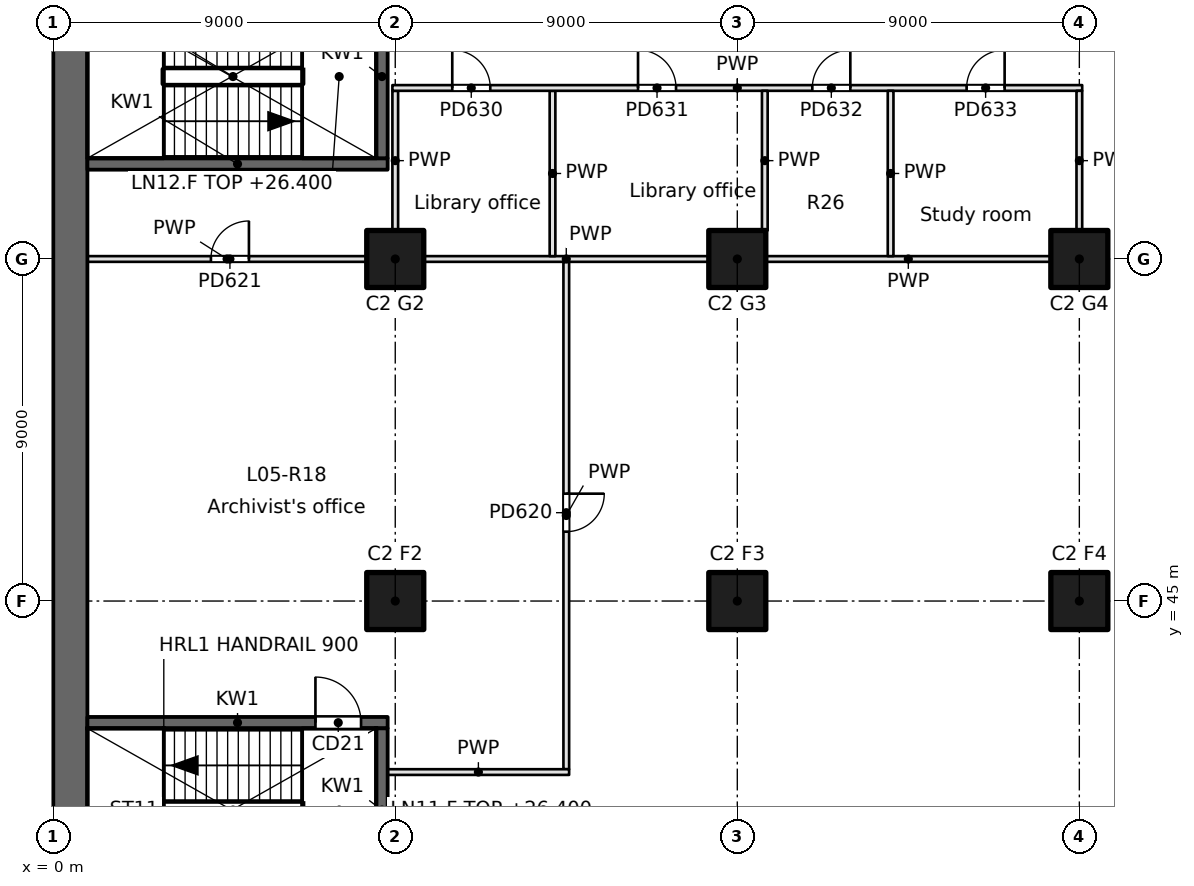
"""IFC4 building model, lengths in metres.
Left out: names, types, materials, properties, quantities, classifications, styles, units other than length and angle.
Written with IfcOpenShell. Run it as: python <this file> out.ifc"""

import sys

from ifc_helpers import new_model, si_unit, direction, frame, frame_2d, origin, origin_2d, place, context, subcontext, project, spatial, rectangle, extrude, element, fill, save


model = new_model("IFC4")
c1 = context("Model", 3, precision=1e-05, world=origin(), true_north=direction((0.0, 1.0)))
c2 = subcontext(c1, "Body", "Model", "MODEL_VIEW")
j1 = project(units=[si_unit("LENGTHUNIT", "METRE"), si_unit("PLANEANGLEUNIT", "RADIAN")], contexts=[c1])
p1 = place(None, origin())
s1 = spatial("IfcSite", under=j1, at=p1, CompositionType="ELEMENT")
p2 = place(p1, origin())
s2 = spatial("IfcBuilding", under=s1, at=p2, CompositionType="ELEMENT")
p3 = place(p2, frame((0.0, 0.0, 26.4)))
s3 = spatial("IfcBuildingStorey", under=s2, at=p3, CompositionType="ELEMENT", Elevation=26.4)
for number, where, z_axis, x_axis in (
    (1, (9.0, 45.0, 0.0), (0.0, 0.0, 1.0), (1.0, 0.0, 0.0)),
    (2, (9.0, 54.0, 0.0), (0.0, 0.0, 1.0), (1.0, 0.0, 0.0)),
    (3, (18.0, 45.0, 0.0), (0.0, 0.0, 1.0), (1.0, 0.0, 0.0)),
    (4, (18.0, 54.0, 0.0), (0.0, 0.0, 1.0), (1.0, 0.0, 0.0)),
    (5, (27.0, 45.0, 0.0), (0.0, 0.0, 1.0), (1.0, 0.0, 0.0)),
    (6, (27.0, 54.0, 0.0), (0.0, 0.0, 1.0), (1.0, 0.0, 0.0)),
):
    element("IfcColumn", number, at=place(p3, frame(where, z_axis=z_axis, x_axis=x_axis)), inside=s3, PredefinedType="COLUMN", context=c2, shape_type="SweptSolid", body=[
        extrude(rectangle(XDim=1.5, YDim=1.5, at=origin_2d()), origin(), (0.0, 0.0, 1.0), 4.8),
    ])
p4 = place(p3, frame((0.45, 94.5, 0.0), z_axis=(0.0, 0.0, 1.0), x_axis=(0.0, -1.0, 0.0)))
e7 = element("IfcWall", 7, at=p4, inside=s3, PredefinedType="SHEAR", context=c2, shape_type="SweptSolid", body=[
    extrude(rectangle(XDim=66.085, YDim=0.9, at=frame_2d((33.042, 0.0))), origin(), (0.0, 0.0, 1.0), 4.8),
])
p5 = place(p3, frame((0.9, 41.8, -0.35), z_axis=(0.0, 0.0, 1.0), x_axis=(1.0, 0.0, 0.0)))
e8 = element("IfcWall", 8, at=p5, inside=s3, PredefinedType="SOLIDWALL", context=c2, shape_type="SweptSolid", body=[
    extrude(rectangle(XDim=7.9, YDim=0.3, at=frame_2d((3.95, 0.0))), origin(), (0.0, 0.0, 1.0), 4.7),
])
p6 = place(p5, frame((6.0, 0.0, 0.35)))
e9 = element("IfcOpeningElement", 9, at=p6, cuts=e8, PredefinedType="OPENING", context=c2, shape_type="SweptSolid", body=[
    extrude(rectangle(XDim=1.2, YDim=2.1, at=frame_2d((0.6, 1.05))), frame((0.0, 0.15, 0.0), z_axis=(0.0, -1.0, 0.0), x_axis=(1.0, 0.0, 0.0)), (0.0, 0.0, 1.0), 0.3),
])
p7 = place(p3, frame((0.9, 56.5, -0.35), z_axis=(0.0, 0.0, 1.0), x_axis=(1.0, 0.0, 0.0)))
e10 = element("IfcWall", 10, at=p7, inside=s3, PredefinedType="SOLIDWALL", context=c2, shape_type="SweptSolid", body=[
    extrude(rectangle(XDim=7.9, YDim=0.3, at=frame_2d((3.95, 0.0))), origin(), (0.0, 0.0, 1.0), 4.7),
])
p8 = place(p3, frame((8.65, 37.35, -0.35), z_axis=(0.0, 0.0, 1.0), x_axis=(0.0, 1.0, 0.0)))
e11 = element("IfcWall", 11, at=p8, inside=s3, PredefinedType="SOLIDWALL", context=c2, shape_type="SweptSolid", body=[
    extrude(rectangle(XDim=4.3, YDim=0.3, at=frame_2d((2.15, 0.0))), origin(), (0.0, 0.0, 1.0), 4.7),
])
p9 = place(p3, frame((8.65, 56.65, -0.35), z_axis=(0.0, 0.0, 1.0), x_axis=(0.0, 1.0, 0.0)))
e12 = element("IfcWall", 12, at=p9, inside=s3, PredefinedType="SOLIDWALL", context=c2, shape_type="SweptSolid", body=[
    extrude(rectangle(XDim=4.3, YDim=0.3, at=frame_2d((2.15, 0.0))), origin(), (0.0, 0.0, 1.0), 4.7),
])
p10 = place(p3, frame((0.9, 54.0, 0.0), z_axis=(0.0, 0.0, 1.0), x_axis=(1.0, 0.0, 0.0)))
e13 = element("IfcWall", 13, at=p10, inside=s3, PredefinedType="PARTITIONING", context=c2, shape_type="SweptSolid", body=[
    extrude(rectangle(XDim=7.35, YDim=0.15, at=frame_2d((3.675, 0.0))), origin(), (0.0, 0.0, 1.0), 4.35),
])
p11 = place(p10, frame((3.25, 0.0, 0.0)))
e14 = element("IfcOpeningElement", 14, at=p11, cuts=e13, PredefinedType="OPENING", context=c2, shape_type="SweptSolid", body=[
    extrude(rectangle(XDim=1.0, YDim=2.1, at=frame_2d((0.5, 1.05))), frame((0.0, 0.075, 0.0), z_axis=(0.0, -1.0, 0.0), x_axis=(1.0, 0.0, 0.0)), (0.0, 0.0, 1.0), 0.15),
])
for number, where, z_axis, x_axis in (
    (15, (9.75, 54.0, 0.0), (0.0, 0.0, 1.0), (1.0, 0.0, 0.0)),
    (16, (26.25, 54.0, 0.0), (0.0, 0.0, 1.0), (-1.0, 0.0, 0.0)),
):
    element("IfcWall", number, at=place(p3, frame(where, z_axis=z_axis, x_axis=x_axis)), inside=s3, PredefinedType="PARTITIONING", context=c2, shape_type="SweptSolid", body=[
        extrude(rectangle(XDim=7.5, YDim=0.15, at=frame_2d((3.75, 0.0))), origin(), (0.0, 0.0, 1.0), 4.35),
    ])
p12 = place(p3, frame((13.5, 53.925, 0.0), z_axis=(0.0, 0.0, 1.0), x_axis=(0.0, -1.0, 0.0)))
e17 = element("IfcWall", 17, at=p12, inside=s3, PredefinedType="PARTITIONING", context=c2, shape_type="SweptSolid", body=[
    extrude(rectangle(XDim=13.35, YDim=0.15, at=frame_2d((6.675, 0.0))), origin(), (0.0, 0.0, 1.0), 4.35),
])
p13 = place(p12, frame((6.1, 0.0, 0.0)))
e18 = element("IfcOpeningElement", 18, at=p13, cuts=e17, PredefinedType="OPENING", context=c2, shape_type="SweptSolid", body=[
    extrude(rectangle(XDim=1.0, YDim=2.1, at=frame_2d((0.5, 1.05))), frame((0.0, 0.075, 0.0), z_axis=(0.0, -1.0, 0.0), x_axis=(1.0, 0.0, 0.0)), (0.0, 0.0, 1.0), 0.15),
])
p14 = place(p3, frame((13.575, 40.5, 0.0), z_axis=(0.0, 0.0, 1.0), x_axis=(-1.0, 0.0, 0.0)))
e19 = element("IfcWall", 19, at=p14, inside=s3, PredefinedType="PARTITIONING", context=c2, shape_type="SweptSolid", body=[
    extrude(rectangle(XDim=4.775, YDim=0.15, at=frame_2d((2.387, 0.0))), origin(), (0.0, 0.0, 1.0), 4.35),
])
p15 = place(p3, frame((13.138, 54.075, 0.0), z_axis=(0.0, 0.0, 1.0), x_axis=(0.0, 1.0, 0.0)))
e20 = element("IfcWall", 20, at=p15, inside=s3, PredefinedType="PARTITIONING", context=c2, shape_type="SweptSolid", body=[
    extrude(rectangle(XDim=4.35, YDim=0.15, at=frame_2d((2.175, 0.0))), origin(), (0.0, 0.0, 1.0), 4.35),
])
p16 = place(p3, frame((9.0, 54.75, 0.0), z_axis=(0.0, 0.0, 1.0), x_axis=(0.0, 1.0, 0.0)))
e21 = element("IfcWall", 21, at=p16, inside=s3, PredefinedType="PARTITIONING", context=c2, shape_type="SweptSolid", body=[
    extrude(rectangle(XDim=3.675, YDim=0.15, at=frame_2d((1.837, 0.0))), origin(), (0.0, 0.0, 1.0), 4.35),
])
p17 = place(p3, frame((8.925, 58.5, 0.0), z_axis=(0.0, 0.0, 1.0), x_axis=(1.0, 0.0, 0.0)))
e22 = element("IfcWall", 22, at=p17, inside=s3, PredefinedType="PARTITIONING", context=c2, shape_type="SweptSolid", body=[
    extrude(rectangle(XDim=18.15, YDim=0.15, at=frame_2d((9.075, 0.0))), origin(), (0.0, 0.0, 1.0), 4.35),
])
p18 = place(p17, frame((1.575, 0.0, 0.0)))
e23 = element("IfcOpeningElement", 23, at=p18, cuts=e22, PredefinedType="OPENING", context=c2, shape_type="SweptSolid", body=[
    extrude(rectangle(XDim=1.0, YDim=2.1, at=frame_2d((0.5, 1.05))), frame((0.0, 0.075, 0.0), z_axis=(0.0, -1.0, 0.0), x_axis=(1.0, 0.0, 0.0)), (0.0, 0.0, 1.0), 0.15),
])
p19 = place(p17, frame((6.463, 0.0, 0.0)))
e24 = element("IfcOpeningElement", 24, at=p19, cuts=e22, PredefinedType="OPENING", context=c2, shape_type="SweptSolid", body=[
    extrude(rectangle(XDim=1.0, YDim=2.1, at=frame_2d((0.5, 1.05))), frame((0.0, 0.075, 0.0), z_axis=(0.0, -1.0, 0.0), x_axis=(1.0, 0.0, 0.0)), (0.0, 0.0, 1.0), 0.15),
])
p20 = place(p17, frame((11.049, 0.0, 0.0)))
e25 = element("IfcOpeningElement", 25, at=p20, cuts=e22, PredefinedType="OPENING", context=c2, shape_type="SweptSolid", body=[
    extrude(rectangle(XDim=1.0, YDim=2.1, at=frame_2d((0.5, 1.05))), frame((0.0, 0.075, 0.0), z_axis=(0.0, -1.0, 0.0), x_axis=(1.0, 0.0, 0.0)), (0.0, 0.0, 1.0), 0.15),
])
p21 = place(p17, frame((15.109, 0.0, 0.0)))
e26 = element("IfcOpeningElement", 26, at=p21, cuts=e22, PredefinedType="OPENING", context=c2, shape_type="SweptSolid", body=[
    extrude(rectangle(XDim=1.0, YDim=2.1, at=frame_2d((0.5, 1.05))), frame((0.0, 0.075, 0.0), z_axis=(0.0, -1.0, 0.0), x_axis=(1.0, 0.0, 0.0)), (0.0, 0.0, 1.0), 0.15),
])
p22 = place(p3, frame((18.724, 54.75, 0.0), z_axis=(0.0, 0.0, 1.0), x_axis=(0.0, 1.0, 0.0)))
e27 = element("IfcWall", 27, at=p22, inside=s3, PredefinedType="PARTITIONING", context=c2, shape_type="SweptSolid", body=[
    extrude(rectangle(XDim=3.675, YDim=0.15, at=frame_2d((1.837, 0.0))), origin(), (0.0, 0.0, 1.0), 4.35),
])
p23 = place(p3, frame((22.034, 54.075, 0.0), z_axis=(0.0, 0.0, 1.0), x_axis=(0.0, 1.0, 0.0)))
e28 = element("IfcWall", 28, at=p23, inside=s3, PredefinedType="PARTITIONING", context=c2, shape_type="SweptSolid", body=[
    extrude(rectangle(XDim=4.35, YDim=0.15, at=frame_2d((2.175, 0.0))), origin(), (0.0, 0.0, 1.0), 4.35),
])
p24 = place(p3, frame((27.0, 58.425, 0.0), z_axis=(0.0, 0.0, 1.0), x_axis=(0.0, -1.0, 0.0)))
e29 = element("IfcWall", 29, at=p24, inside=s3, PredefinedType="PARTITIONING", context=c2, shape_type="SweptSolid", body=[
    extrude(rectangle(XDim=3.675, YDim=0.15, at=frame_2d((1.837, 0.0))), origin(), (0.0, 0.0, 1.0), 4.35),
])
p25 = place(p6, origin())
e30 = element("IfcDoor", 30, at=p25, inside=s3, OperationType="SINGLE_SWING_LEFT", PredefinedType="DOOR", context=c2, shape_type="SweptSolid", body=[
    extrude(rectangle(XDim=1.2, YDim=2.1, at=frame_2d((0.6, 1.05))), frame((0.0, 0.025, 0.0), z_axis=(0.0, -1.0, 0.0), x_axis=(1.0, 0.0, 0.0)), (0.0, 0.0, 1.0), 0.05),
])
fill(e9, e30)
p26 = place(p13, origin())
e31 = element("IfcDoor", 31, at=p26, inside=s3, OperationType="SINGLE_SWING_LEFT", PredefinedType="DOOR", context=c2, shape_type="SweptSolid", body=[
    extrude(rectangle(XDim=1.0, YDim=2.1, at=frame_2d((0.5, 1.05))), frame((0.0, 0.025, 0.0), z_axis=(0.0, -1.0, 0.0), x_axis=(1.0, 0.0, 0.0)), (0.0, 0.0, 1.0), 0.05),
])
fill(e18, e31)
p27 = place(p11, origin())
e32 = element("IfcDoor", 32, at=p27, inside=s3, OperationType="SINGLE_SWING_RIGHT", PredefinedType="DOOR", context=c2, shape_type="SweptSolid", body=[
    extrude(rectangle(XDim=1.0, YDim=2.1, at=frame_2d((0.5, 1.05))), frame((0.0, 0.025, 0.0), z_axis=(0.0, -1.0, 0.0), x_axis=(1.0, 0.0, 0.0)), (0.0, 0.0, 1.0), 0.05),
])
fill(e14, e32)
p28 = place(p18, origin())
e33 = element("IfcDoor", 33, at=p28, inside=s3, OperationType="SINGLE_SWING_LEFT", PredefinedType="DOOR", context=c2, shape_type="SweptSolid", body=[
    extrude(rectangle(XDim=1.0, YDim=2.1, at=frame_2d((0.5, 1.05))), frame((0.0, 0.025, 0.0), z_axis=(0.0, -1.0, 0.0), x_axis=(1.0, 0.0, 0.0)), (0.0, 0.0, 1.0), 0.05),
])
fill(e23, e33)
p29 = place(p19, origin())
e34 = element("IfcDoor", 34, at=p29, inside=s3, OperationType="SINGLE_SWING_LEFT", PredefinedType="DOOR", context=c2, shape_type="SweptSolid", body=[
    extrude(rectangle(XDim=1.0, YDim=2.1, at=frame_2d((0.5, 1.05))), frame((0.0, 0.025, 0.0), z_axis=(0.0, -1.0, 0.0), x_axis=(1.0, 0.0, 0.0)), (0.0, 0.0, 1.0), 0.05),
])
fill(e24, e34)
p30 = place(p20, origin())
e35 = element("IfcDoor", 35, at=p30, inside=s3, OperationType="SINGLE_SWING_RIGHT", PredefinedType="DOOR", context=c2, shape_type="SweptSolid", body=[
    extrude(rectangle(XDim=1.0, YDim=2.1, at=frame_2d((0.5, 1.05))), frame((0.0, 0.025, 0.0), z_axis=(0.0, -1.0, 0.0), x_axis=(1.0, 0.0, 0.0)), (0.0, 0.0, 1.0), 0.05),
])
fill(e25, e35)
p31 = place(p21, origin())
e36 = element("IfcDoor", 36, at=p31, inside=s3, OperationType="SINGLE_SWING_RIGHT", PredefinedType="DOOR", context=c2, shape_type="SweptSolid", body=[
    extrude(rectangle(XDim=1.0, YDim=2.1, at=frame_2d((0.5, 1.05))), frame((0.0, 0.025, 0.0), z_axis=(0.0, -1.0, 0.0), x_axis=(1.0, 0.0, 0.0)), (0.0, 0.0, 1.0), 0.05),
])
fill(e26, e36)
save(model, sys.argv[1])
